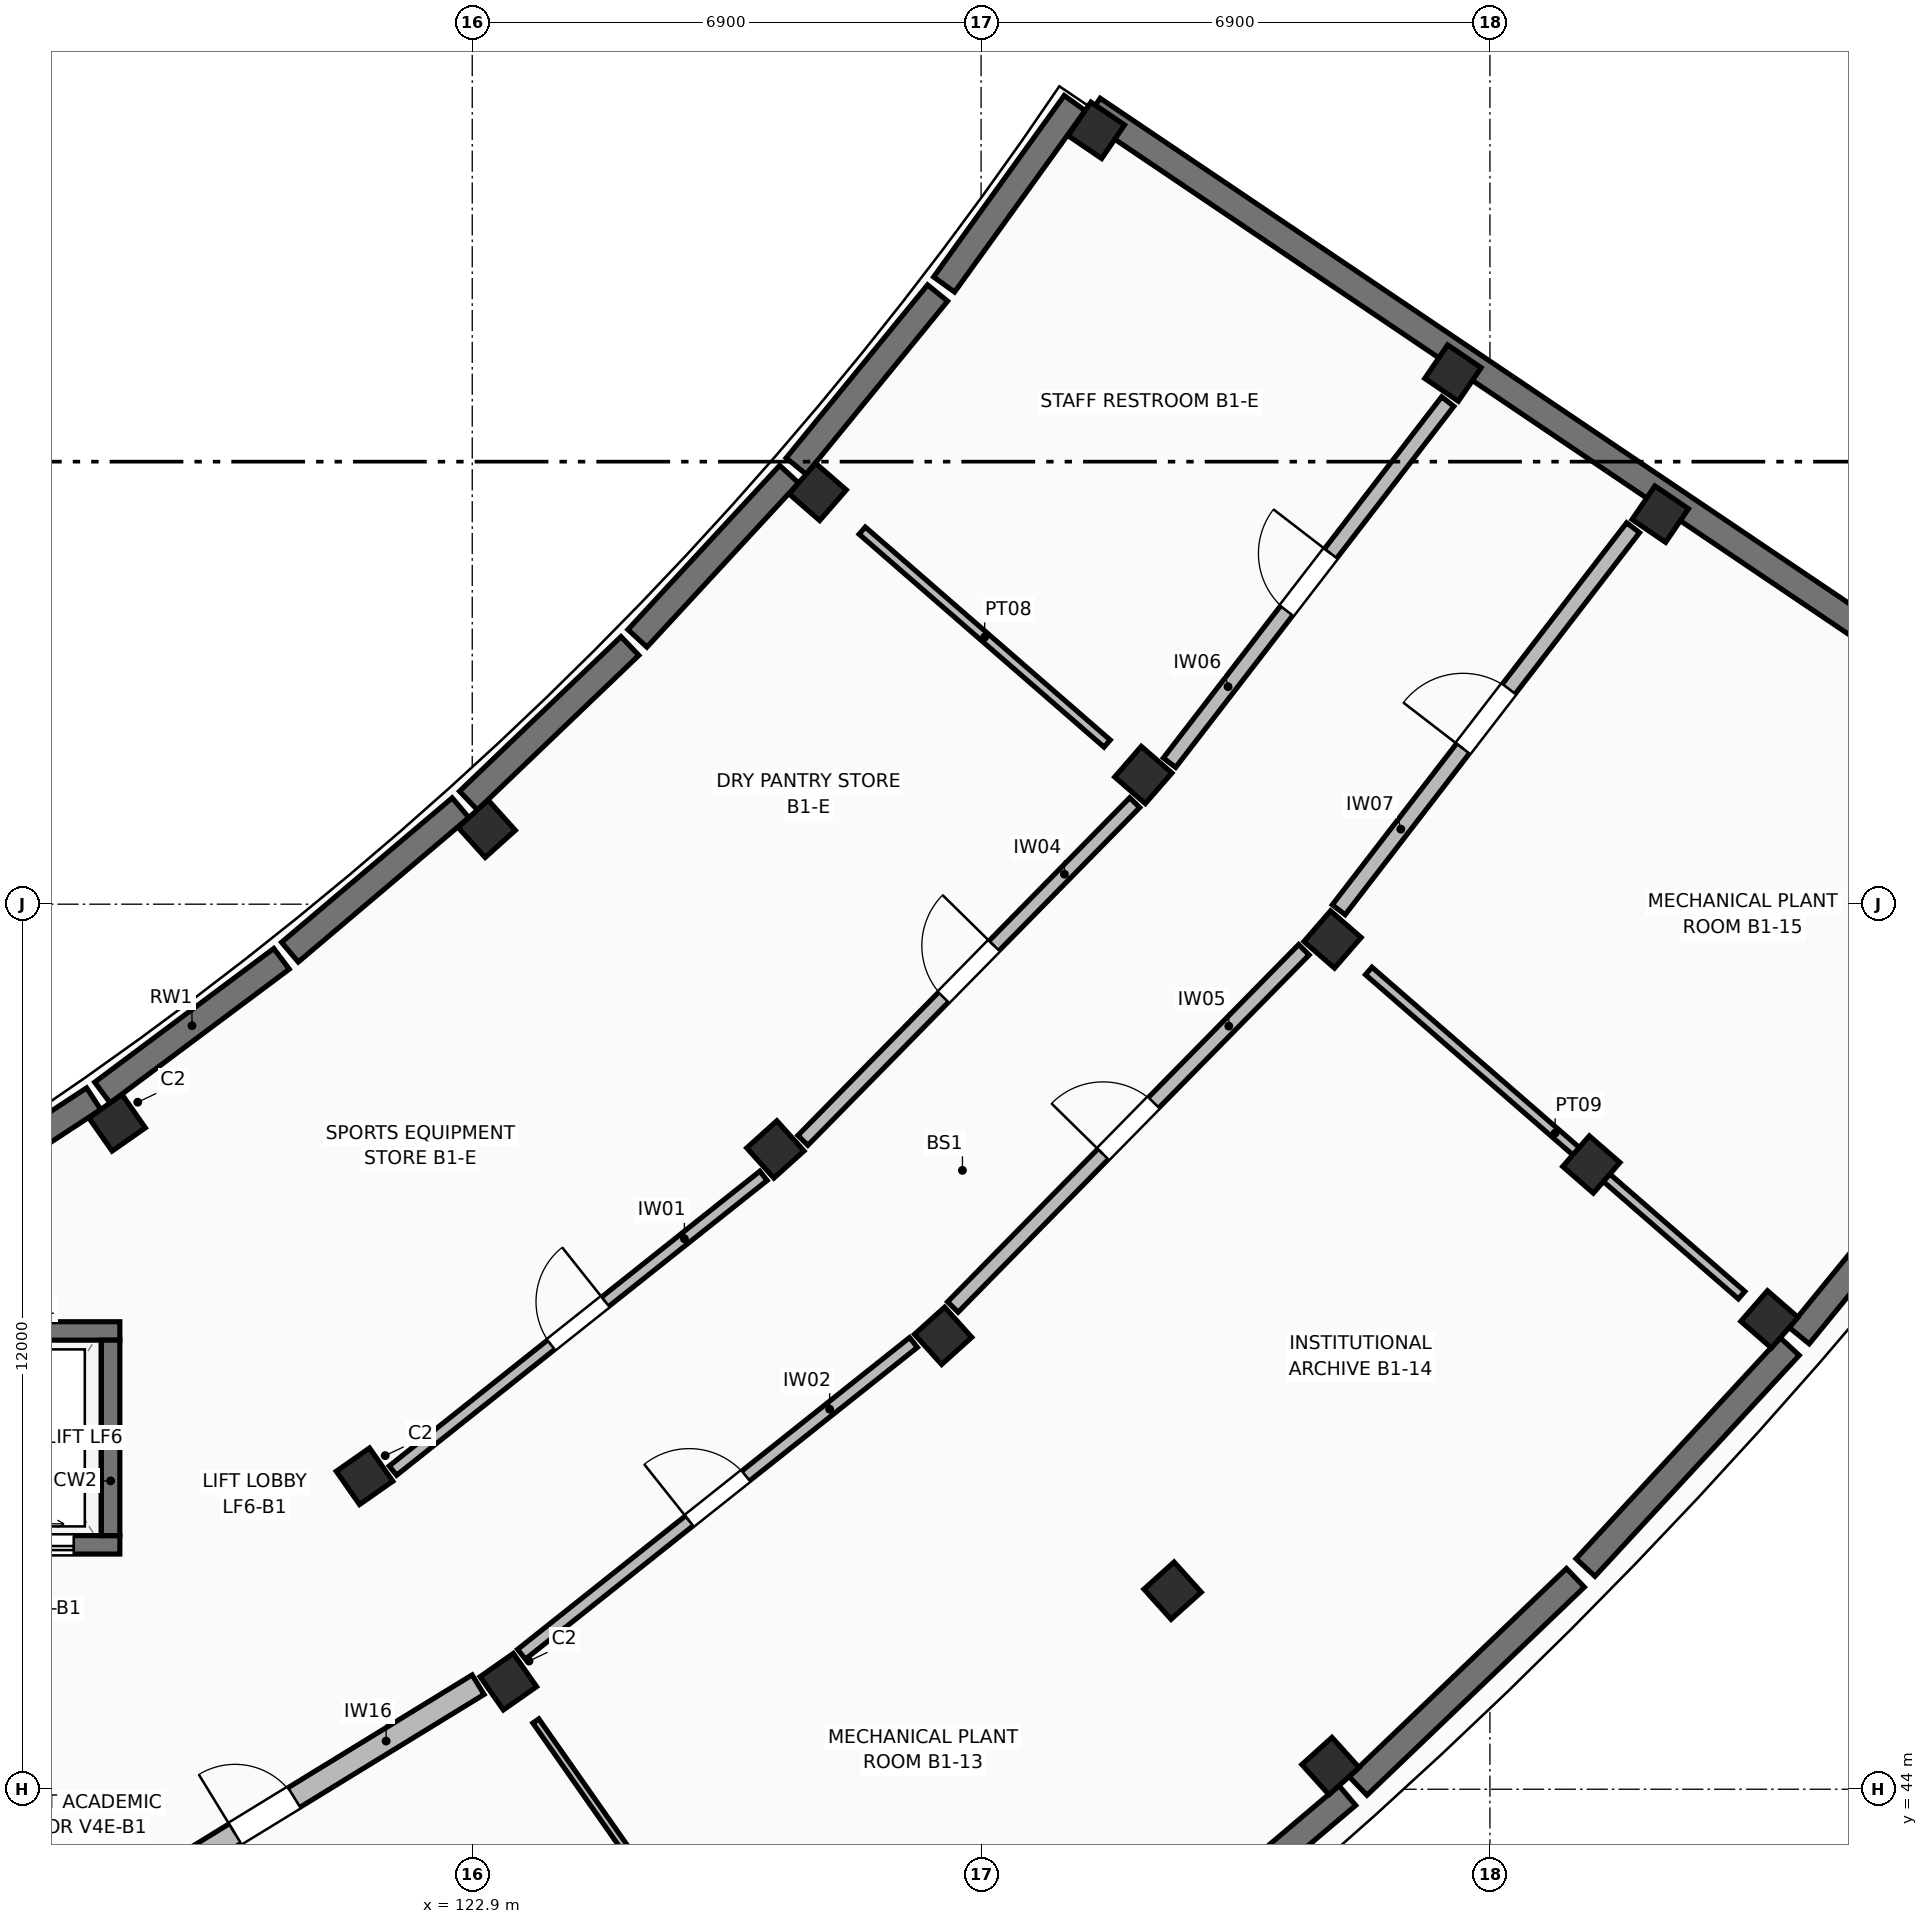
"""IFC4 building model, lengths in metres.
Left out: names, types, materials, properties, quantities, classifications, styles, units other than length and angle.
Written with IfcOpenShell. Run it as: python <this file> out.ifc"""

import sys

from ifc_helpers import new_model, si_unit, direction, frame, frame_2d, origin, origin_2d, place, context, subcontext, project, spatial, rectangle, extrude, element, fill, save


model = new_model("IFC4")
c1 = context("Model", 3, precision=1e-05, world=origin(), true_north=direction((0.0, 1.0)))
c2 = subcontext(c1, "Body", "Model", "MODEL_VIEW")
j1 = project(units=[si_unit("LENGTHUNIT", "METRE"), si_unit("PLANEANGLEUNIT", "RADIAN")], contexts=[c1])
p1 = place(None, origin())
s1 = spatial("IfcSite", under=j1, at=p1, CompositionType="ELEMENT")
p2 = place(p1, origin())
s2 = spatial("IfcBuilding", under=s1, at=p2, CompositionType="ELEMENT")
p3 = place(p2, frame((0.0, 0.0, -4.08)))
s3 = spatial("IfcBuildingStorey", under=s2, at=p3, CompositionType="ELEMENT", Elevation=-4.08)
for number, where, z_axis, x_axis in (
    (1, (118.084, 53.035, 0.0), (0.0, 0.0, 1.0), (0.574, -0.819, 0.0)),
    (2, (121.439, 48.243, 0.0), (0.0, 0.0, 1.0), (0.574, -0.819, 0.0)),
    (3, (123.39, 45.458, 0.0), (0.0, 0.0, 1.0), (0.574, -0.819, 0.0)),
    (4, (123.096, 57.022, 0.0), (0.0, 0.0, 1.0), (0.669, -0.743, 0.0)),
    (5, (127.01, 52.675, 0.0), (0.0, 0.0, 1.0), (0.669, -0.743, 0.0)),
    (6, (129.285, 50.148, 0.0), (0.0, 0.0, 1.0), (0.669, -0.743, 0.0)),
    (7, (132.397, 46.692, 0.0), (0.0, 0.0, 1.0), (0.669, -0.743, 0.0)),
    (8, (134.538, 44.314, 0.0), (0.0, 0.0, 1.0), (0.669, -0.743, 0.0)),
    (9, (127.584, 61.59, 0.0), (0.0, 0.0, 1.0), (0.755, -0.656, 0.0)),
    (10, (132.0, 57.752, 0.0), (0.0, 0.0, 1.0), (0.755, -0.656, 0.0)),
    (11, (134.566, 55.521, 0.0), (0.0, 0.0, 1.0), (0.755, -0.656, 0.0)),
    (12, (138.075, 52.47, 0.0), (0.0, 0.0, 1.0), (0.755, -0.656, 0.0)),
    (13, (140.49, 50.371, 0.0), (0.0, 0.0, 1.0), (0.755, -0.656, 0.0)),
    (14, (131.363, 66.492, 0.0), (0.0, 0.0, 1.0), (0.827, -0.563, 0.0)),
    (15, (136.199, 63.201, 0.0), (0.0, 0.0, 1.0), (0.827, -0.563, 0.0)),
    (16, (139.01, 61.288, 0.0), (0.0, 0.0, 1.0), (0.827, -0.563, 0.0)),
):
    element("IfcColumn", number, at=place(p3, frame(where, z_axis=z_axis, x_axis=x_axis)), inside=s3, PredefinedType="COLUMN", context=c2, shape_type="SweptSolid", body=[
        extrude(rectangle(XDim=0.55, YDim=0.55, at=origin_2d()), origin(), (0.0, 0.0, 1.0), 4.08),
    ])
p4 = place(p3, frame((115.771, 50.214, 0.0), z_axis=(0.0, 0.0, 1.0), x_axis=(1.0, 0.0, 0.0)))
e17 = element("IfcWall", 17, at=p4, inside=s3, PredefinedType="SHEAR", context=c2, shape_type="SweptSolid", body=[
    extrude(rectangle(XDim=2.35, YDim=0.25, at=frame_2d((1.175, 0.0))), origin(), (0.0, 0.0, 1.0), 3.82),
])
p5 = place(p3, frame((115.771, 47.314, 0.0), z_axis=(0.0, 0.0, 1.0), x_axis=(1.0, 0.0, 0.0)))
e18 = element("IfcWall", 18, at=p5, inside=s3, PredefinedType="SHEAR", context=c2, shape_type="SweptSolid", body=[
    extrude(rectangle(XDim=2.35, YDim=0.25, at=frame_2d((1.175, 0.0))), origin(), (0.0, 0.0, 1.0), 3.82),
])
p6 = place(p5, frame((0.625, 0.0, 0.0)))
e19 = element("IfcOpeningElement", 19, at=p6, cuts=e18, PredefinedType="OPENING", context=c2, shape_type="SweptSolid", body=[
    extrude(rectangle(XDim=1.1, YDim=2.15, at=frame_2d((0.55, 1.075))), frame((0.0, 0.135, 0.0), z_axis=(0.0, -1.0, 0.0), x_axis=(1.0, 0.0, 0.0)), (0.0, 0.0, 1.0), 0.27),
])
p7 = place(p3, frame((117.996, 47.439, 0.0), z_axis=(0.0, 0.0, 1.0), x_axis=(0.0, 1.0, 0.0)))
e20 = element("IfcWall", 20, at=p7, inside=s3, PredefinedType="SHEAR", context=c2, shape_type="SweptSolid", body=[
    extrude(rectangle(XDim=2.65, YDim=0.25, at=frame_2d((1.325, 0.0))), origin(), (0.0, 0.0, 1.0), 3.82),
])
p8 = place(p3, frame((115.232, 51.701, 0.0), z_axis=(0.0, 0.0, 1.0), x_axis=(0.836276459037, 0.548308019328, 0.0)))
e21 = element("IfcWall", 21, at=p8, inside=s3, PredefinedType="USERDEFINED", context=c2, shape_type="SweptSolid", body=[
    extrude(rectangle(XDim=3.031, YDim=0.35, at=frame_2d((1.516, 0.0))), origin(), (0.0, 0.0, 1.0), 3.065),
])
for number, where, z_axis, x_axis in (
    (22, (117.885, 53.446, 0.0), (0.0, 0.0, 1.0), (0.801, 0.598, 0.0)),
    (23, (120.427, 55.35, 0.0), (0.0, 0.0, 1.0), (0.763, 0.646, 0.0)),
):
    element("IfcWall", number, at=place(p3, frame(where, z_axis=z_axis, x_axis=x_axis)), inside=s3, PredefinedType="USERDEFINED", context=c2, shape_type="SweptSolid", body=[
        extrude(rectangle(XDim=3.031, YDim=0.35, at=frame_2d((1.515, 0.0))), origin(), (0.0, 0.0, 1.0), 3.065),
    ])
p9 = place(p3, frame((131.653, 41.278, 0.0), z_axis=(0.0, 0.0, 1.0), x_axis=(0.763204670494, 0.646156816057, 0.0)))
e24 = element("IfcWall", 24, at=p9, inside=s3, PredefinedType="USERDEFINED", context=c2, shape_type="SweptSolid", body=[
    extrude(rectangle(XDim=4.08, YDim=0.35, at=frame_2d((2.04, 0.0))), origin(), (0.0, 0.0, 1.0), 3.065),
])
p10 = place(p3, frame((122.849, 57.405, 0.0), z_axis=(0.0, 0.0, 1.0), x_axis=(0.722363654033, 0.691513377551, 0.0)))
e25 = element("IfcWall", 25, at=p10, inside=s3, PredefinedType="USERDEFINED", context=c2, shape_type="SweptSolid", body=[
    extrude(rectangle(XDim=3.031, YDim=0.35, at=frame_2d((1.516, 0.0))), origin(), (0.0, 0.0, 1.0), 3.065),
])
p11 = place(p3, frame((134.912, 44.045, 0.0), z_axis=(0.0, 0.0, 1.0), x_axis=(0.722376692903, 0.691499756725, 0.0)))
e26 = element("IfcWall", 26, at=p11, inside=s3, PredefinedType="USERDEFINED", context=c2, shape_type="SweptSolid", body=[
    extrude(rectangle(XDim=4.08, YDim=0.35, at=frame_2d((2.04, 0.0))), origin(), (0.0, 0.0, 1.0), 3.065),
])
p12 = place(p3, frame((125.14, 59.604, 0.0), z_axis=(0.0, 0.0, 1.0), x_axis=(0.678811877156, 0.734312219313, 0.0)))
e27 = element("IfcWall", 27, at=p12, inside=s3, PredefinedType="USERDEFINED", context=c2, shape_type="SweptSolid", body=[
    extrude(rectangle(XDim=3.031, YDim=0.35, at=frame_2d((1.515, 0.0))), origin(), (0.0, 0.0, 1.0), 3.065),
])
p13 = place(p3, frame((137.996, 47.006, 0.0), z_axis=(0.0, 0.0, 1.0), x_axis=(0.678764601476, 0.734355919009, 0.0)))
e28 = element("IfcWall", 28, at=p13, inside=s3, PredefinedType="USERDEFINED", context=c2, shape_type="SweptSolid", body=[
    extrude(rectangle(XDim=4.08, YDim=0.35, at=frame_2d((2.04, 0.0))), origin(), (0.0, 0.0, 1.0), 3.065),
])
p14 = place(p3, frame((127.292, 61.94, 0.0), z_axis=(0.0, 0.0, 1.0), x_axis=(0.632706899842, 0.77439136029, 0.0)))
e29 = element("IfcWall", 29, at=p14, inside=s3, PredefinedType="USERDEFINED", context=c2, shape_type="SweptSolid", body=[
    extrude(rectangle(XDim=3.031, YDim=0.35, at=frame_2d((1.516, 0.0))), origin(), (0.0, 0.0, 1.0), 3.065),
])
p15 = place(p3, frame((140.894, 50.15, 0.0), z_axis=(0.0, 0.0, 1.0), x_axis=(0.632696698526, 0.774399695037, 0.0)))
e30 = element("IfcWall", 30, at=p15, inside=s3, PredefinedType="USERDEFINED", context=c2, shape_type="SweptSolid", body=[
    extrude(rectangle(XDim=4.08, YDim=0.35, at=frame_2d((2.04, 0.0))), origin(), (0.0, 0.0, 1.0), 3.065),
])
p16 = place(p3, frame((129.299, 64.402, 0.0), z_axis=(0.0, 0.0, 1.0), x_axis=(0.584251673289, 0.811572536659, 0.0)))
e31 = element("IfcWall", 31, at=p16, inside=s3, PredefinedType="USERDEFINED", context=c2, shape_type="SweptSolid", body=[
    extrude(rectangle(XDim=3.031, YDim=0.35, at=frame_2d((1.515, 0.0))), origin(), (0.0, 0.0, 1.0), 3.065),
])
p17 = place(p3, frame((131.317, 66.782, 0.0), z_axis=(0.0, 0.0, 1.0), x_axis=(0.829039791681, -0.559189613468, 0.0)))
e32 = element("IfcWall", 32, at=p17, inside=s3, PredefinedType="USERDEFINED", context=c2, shape_type="SweptSolid", body=[
    extrude(rectangle(XDim=17.5, YDim=0.35, at=frame_2d((8.75, 0.0))), origin(), (0.0, 0.0, 1.0), 3.065),
])
p18 = place(p3, frame((117.189, 41.869, 0.0), z_axis=(0.0, 0.0, 1.0), x_axis=(0.852640514979, 0.522497992547, 0.0)))
e33 = element("IfcWall", 33, at=p18, inside=s3, PredefinedType="STANDARD", context=c2, shape_type="SweptSolid", body=[
    extrude(rectangle(XDim=6.792, YDim=0.31, at=frame_2d((3.396, 0.0))), origin(), (0.0, 0.0, 1.0), 2.72),
])
p19 = place(p18, frame((2.926, 0.0, 0.0)))
e34 = element("IfcOpeningElement", 34, at=p19, cuts=e33, PredefinedType="OPENING", context=c2, shape_type="SweptSolid", body=[
    extrude(rectangle(XDim=0.94, YDim=2.18, at=frame_2d((0.47, 1.09))), frame((0.0, 0.165, 0.0), z_axis=(0.0, -1.0, 0.0), x_axis=(1.0, 0.0, 0.0)), (0.0, 0.0, 1.0), 0.33),
])
p20 = place(p3, frame((121.824, 48.32, 0.0), z_axis=(0.0, 0.0, 1.0), x_axis=(0.782605685559, 0.622517743467, 0.0)))
e35 = element("IfcWall", 35, at=p20, inside=s3, PredefinedType="STANDARD", context=c2, shape_type="SweptSolid", body=[
    extrude(rectangle(XDim=6.42, YDim=0.16, at=frame_2d((3.21, 0.0))), origin(), (0.0, 0.0, 1.0), 2.72),
])
p21 = place(p20, frame((2.74, 0.0, 0.0)))
e36 = element("IfcOpeningElement", 36, at=p21, cuts=e35, PredefinedType="OPENING", context=c2, shape_type="SweptSolid", body=[
    extrude(rectangle(XDim=0.94, YDim=2.24, at=frame_2d((0.47, 1.12))), frame((0.0, 0.09, 0.0), z_axis=(0.0, -1.0, 0.0), x_axis=(1.0, 0.0, 0.0)), (0.0, 0.0, 1.0), 0.18),
])
p22 = place(p3, frame((123.568, 45.83, 0.0), z_axis=(0.0, 0.0, 1.0), x_axis=(0.782615780998, 0.622505051653, 0.0)))
e37 = element("IfcWall", 37, at=p22, inside=s3, PredefinedType="STANDARD", context=c2, shape_type="SweptSolid", body=[
    extrude(rectangle(XDim=6.792, YDim=0.17, at=frame_2d((3.396, 0.0))), origin(), (0.0, 0.0, 1.0), 2.72),
])
p23 = place(p22, frame((2.906, 0.0, 0.0)))
e38 = element("IfcOpeningElement", 38, at=p23, cuts=e37, PredefinedType="OPENING", context=c2, shape_type="SweptSolid", body=[
    extrude(rectangle(XDim=0.98, YDim=2.06, at=frame_2d((0.49, 1.03))), frame((0.0, 0.095, 0.0), z_axis=(0.0, -1.0, 0.0), x_axis=(1.0, 0.0, 0.0)), (0.0, 0.0, 1.0), 0.19),
])
p24 = place(p3, frame((123.762, 44.926, 0.0), z_axis=(0.0, 0.0, 1.0), x_axis=(0.57358461614, -0.819146316678, 0.0)))
e39 = element("IfcWall", 39, at=p24, inside=s3, PredefinedType="PARTITIONING", context=c2, shape_type="SweptSolid", body=[
    extrude(rectangle(XDim=6.7, YDim=0.098, at=frame_2d((3.35, 0.0))), origin(), (0.0, 0.0, 1.0), 2.72),
])
p25 = place(p3, frame((127.383, 52.798, 0.0), z_axis=(0.0, 0.0, 1.0), x_axis=(0.700900509406, 0.713259052459, 0.0)))
e40 = element("IfcWall", 40, at=p25, inside=s3, PredefinedType="STANDARD", context=c2, shape_type="SweptSolid", body=[
    extrude(rectangle(XDim=6.42, YDim=0.19, at=frame_2d((3.21, 0.0))), origin(), (0.0, 0.0, 1.0), 2.72),
])
p26 = place(p25, frame((2.72, 0.0, 0.0)))
e41 = element("IfcOpeningElement", 41, at=p26, cuts=e40, PredefinedType="OPENING", context=c2, shape_type="SweptSolid", body=[
    extrude(rectangle(XDim=0.98, YDim=2.12, at=frame_2d((0.49, 1.06))), frame((0.0, 0.105, 0.0), z_axis=(0.0, -1.0, 0.0), x_axis=(1.0, 0.0, 0.0)), (0.0, 0.0, 1.0), 0.21),
])
p27 = place(p3, frame((129.417, 50.539, 0.0), z_axis=(0.0, 0.0, 1.0), x_axis=(0.700914816473, 0.713244993006, 0.0)))
e42 = element("IfcWall", 42, at=p27, inside=s3, PredefinedType="STANDARD", context=c2, shape_type="SweptSolid", body=[
    extrude(rectangle(XDim=6.792, YDim=0.2, at=frame_2d((3.396, 0.0))), origin(), (0.0, 0.0, 1.0), 2.72),
])
p28 = place(p27, frame((2.906, 0.0, 0.0)))
e43 = element("IfcOpeningElement", 43, at=p28, cuts=e42, PredefinedType="OPENING", context=c2, shape_type="SweptSolid", body=[
    extrude(rectangle(XDim=0.98, YDim=2.18, at=frame_2d((0.49, 1.09))), frame((0.0, 0.11, 0.0), z_axis=(0.0, -1.0, 0.0), x_axis=(1.0, 0.0, 0.0)), (0.0, 0.0, 1.0), 0.22),
])
p29 = place(p3, frame((132.355, 57.919, 0.0), z_axis=(0.0, 0.0, 1.0), x_axis=(0.610376740954, 0.79211125109, 0.0)))
e44 = element("IfcWall", 44, at=p29, inside=s3, PredefinedType="STANDARD", context=c2, shape_type="SweptSolid", body=[
    extrude(rectangle(XDim=6.181, YDim=0.21, at=frame_2d((3.09, 0.0))), origin(), (0.0, 0.0, 1.0), 2.72),
])
p30 = place(p29, frame((2.601, 0.0, 0.0)))
e45 = element("IfcOpeningElement", 45, at=p30, cuts=e44, PredefinedType="OPENING", context=c2, shape_type="SweptSolid", body=[
    extrude(rectangle(XDim=0.98, YDim=2.24, at=frame_2d((0.49, 1.12))), frame((0.0, 0.115, 0.0), z_axis=(0.0, -1.0, 0.0), x_axis=(1.0, 0.0, 0.0)), (0.0, 0.0, 1.0), 0.23),
])
p31 = place(p3, frame((134.649, 55.924, 0.0), z_axis=(0.0, 0.0, 1.0), x_axis=(0.610378079511, 0.792110219637, 0.0)))
e46 = element("IfcWall", 46, at=p31, inside=s3, PredefinedType="STANDARD", context=c2, shape_type="SweptSolid", body=[
    extrude(rectangle(XDim=6.54, YDim=0.22, at=frame_2d((3.27, 0.0))), origin(), (0.0, 0.0, 1.0), 2.72),
])
p32 = place(p31, frame((2.76, 0.0, 0.0)))
e47 = element("IfcOpeningElement", 47, at=p32, cuts=e46, PredefinedType="OPENING", context=c2, shape_type="SweptSolid", body=[
    extrude(rectangle(XDim=1.02, YDim=2.06, at=frame_2d((0.51, 1.03))), frame((0.0, 0.12, 0.0), z_axis=(0.0, -1.0, 0.0), x_axis=(1.0, 0.0, 0.0)), (0.0, 0.0, 1.0), 0.24),
])
p33 = place(p3, frame((128.188, 61.065, 0.0), z_axis=(0.0, 0.0, 1.0), x_axis=(0.75471062989, -0.656057821484, 0.0)))
e48 = element("IfcWall", 48, at=p33, inside=s3, PredefinedType="PARTITIONING", context=c2, shape_type="SweptSolid", body=[
    extrude(rectangle(XDim=4.4, YDim=0.128, at=frame_2d((2.2, 0.0))), origin(), (0.0, 0.0, 1.0), 2.72),
])
p34 = place(p3, frame((135.056, 55.095, 0.0), z_axis=(0.0, 0.0, 1.0), x_axis=(0.754721612631, -0.656045187032, 0.0)))
e49 = element("IfcWall", 49, at=p34, inside=s3, PredefinedType="PARTITIONING", context=c2, shape_type="SweptSolid", body=[
    extrude(rectangle(XDim=6.7, YDim=0.134, at=frame_2d((3.35, 0.0))), origin(), (0.0, 0.0, 1.0), 2.72),
])
p35 = place(p6, origin())
e50 = element("IfcDoor", 50, at=p35, inside=s3, OperationType="DOUBLE_DOOR_SLIDING", PredefinedType="DOOR", context=c2, shape_type="SweptSolid", body=[
    extrude(rectangle(XDim=1.1, YDim=2.15, at=frame_2d((0.55, 1.075))), frame((0.0, 0.025, 0.0), z_axis=(0.0, -1.0, 0.0), x_axis=(1.0, 0.0, 0.0)), (0.0, 0.0, 1.0), 0.05),
])
fill(e19, e50)
p36 = place(p19, origin())
e51 = element("IfcDoor", 51, at=p36, inside=s3, OperationType="SINGLE_SWING_LEFT", PredefinedType="DOOR", context=c2, shape_type="SweptSolid", body=[
    extrude(rectangle(XDim=0.94, YDim=2.18, at=frame_2d((0.47, 1.09))), frame((0.0, 0.025, 0.0), z_axis=(0.0, -1.0, 0.0), x_axis=(1.0, 0.0, 0.0)), (0.0, 0.0, 1.0), 0.05),
])
fill(e34, e51)
p37 = place(p21, frame((0.94, 0.0, 0.0), z_axis=(0.0, 0.0, 1.0), x_axis=(-1.0, 0.0, 0.0)))
e52 = element("IfcDoor", 52, at=p37, inside=s3, OperationType="SINGLE_SWING_RIGHT", PredefinedType="DOOR", context=c2, shape_type="SweptSolid", body=[
    extrude(rectangle(XDim=0.94, YDim=2.24, at=frame_2d((0.47, 1.12))), frame((0.0, 0.025, 0.0), z_axis=(0.0, -1.0, 0.0), x_axis=(1.0, 0.0, 0.0)), (0.0, 0.0, 1.0), 0.05),
])
fill(e36, e52)
p38 = place(p23, origin())
e53 = element("IfcDoor", 53, at=p38, inside=s3, OperationType="SINGLE_SWING_LEFT", PredefinedType="DOOR", context=c2, shape_type="SweptSolid", body=[
    extrude(rectangle(XDim=0.98, YDim=2.06, at=frame_2d((0.49, 1.03))), frame((0.0, 0.025, 0.0), z_axis=(0.0, -1.0, 0.0), x_axis=(1.0, 0.0, 0.0)), (0.0, 0.0, 1.0), 0.05),
])
fill(e38, e53)
p39 = place(p26, frame((0.98, 0.0, 0.0), z_axis=(0.0, 0.0, 1.0), x_axis=(-1.0, 0.0, 0.0)))
e54 = element("IfcDoor", 54, at=p39, inside=s3, OperationType="SINGLE_SWING_RIGHT", PredefinedType="DOOR", context=c2, shape_type="SweptSolid", body=[
    extrude(rectangle(XDim=0.98, YDim=2.12, at=frame_2d((0.49, 1.06))), frame((0.0, 0.025, 0.0), z_axis=(0.0, -1.0, 0.0), x_axis=(1.0, 0.0, 0.0)), (0.0, 0.0, 1.0), 0.05),
])
fill(e41, e54)
p40 = place(p28, origin())
e55 = element("IfcDoor", 55, at=p40, inside=s3, OperationType="SINGLE_SWING_LEFT", PredefinedType="DOOR", context=c2, shape_type="SweptSolid", body=[
    extrude(rectangle(XDim=0.98, YDim=2.18, at=frame_2d((0.49, 1.09))), frame((0.0, 0.025, 0.0), z_axis=(0.0, -1.0, 0.0), x_axis=(1.0, 0.0, 0.0)), (0.0, 0.0, 1.0), 0.05),
])
fill(e43, e55)
p41 = place(p30, frame((0.98, 0.0, 0.0), z_axis=(0.0, 0.0, 1.0), x_axis=(-1.0, 0.0, 0.0)))
e56 = element("IfcDoor", 56, at=p41, inside=s3, OperationType="SINGLE_SWING_RIGHT", PredefinedType="DOOR", context=c2, shape_type="SweptSolid", body=[
    extrude(rectangle(XDim=0.98, YDim=2.24, at=frame_2d((0.49, 1.12))), frame((0.0, 0.025, 0.0), z_axis=(0.0, -1.0, 0.0), x_axis=(1.0, 0.0, 0.0)), (0.0, 0.0, 1.0), 0.05),
])
fill(e45, e56)
p42 = place(p32, origin())
e57 = element("IfcDoor", 57, at=p42, inside=s3, OperationType="SINGLE_SWING_LEFT", PredefinedType="DOOR", context=c2, shape_type="SweptSolid", body=[
    extrude(rectangle(XDim=1.02, YDim=2.06, at=frame_2d((0.51, 1.03))), frame((0.0, 0.025, 0.0), z_axis=(0.0, -1.0, 0.0), x_axis=(1.0, 0.0, 0.0)), (0.0, 0.0, 1.0), 0.05),
])
fill(e47, e57)
save(model, sys.argv[1])
